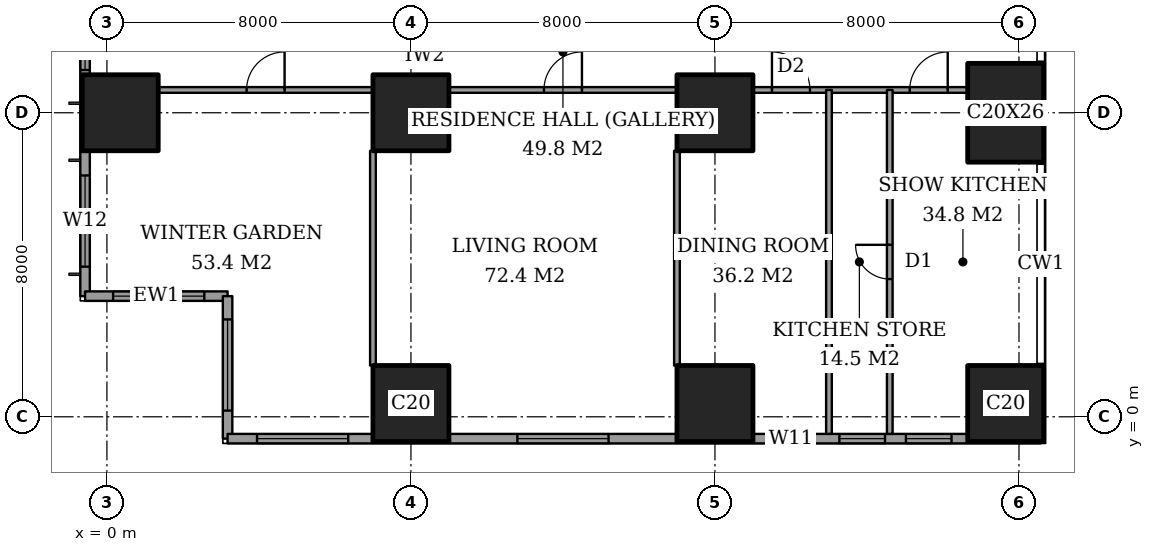
"""IFC4 building model, lengths in metres.
Left out: names, types, materials, properties, quantities, classifications, styles, units other than length and angle.
Written with IfcOpenShell. Run it as: python <this file> out.ifc"""

import sys

from ifc_helpers import new_model, si_unit, direction, frame, frame_2d, origin, origin_2d, place, context, subcontext, project, spatial, rectangle, extrude, element, fill, save


model = new_model("IFC4")
c1 = context("Model", 3, precision=1e-05, world=origin(), true_north=direction((0.0, 1.0)))
c2 = subcontext(c1, "Body", "Model", "MODEL_VIEW")
j1 = project(units=[si_unit("LENGTHUNIT", "METRE"), si_unit("PLANEANGLEUNIT", "RADIAN")], contexts=[c1])
p1 = place(None, origin())
s1 = spatial("IfcSite", under=j1, at=p1, CompositionType="ELEMENT")
p2 = place(p1, origin())
s2 = spatial("IfcBuilding", under=s1, at=p2, CompositionType="ELEMENT")
p3 = place(p2, frame((0.0, 0.0, 157.4)))
s3 = spatial("IfcBuildingStorey", under=s2, at=p3, CompositionType="ELEMENT", Elevation=157.4)
for number, where, z_axis, x_axis in (
    (1, (0.35, 8.0, 0.0), (0.0, 0.0, 1.0), (1.0, 0.0, 0.0)),
    (2, (8.0, 0.35, 0.0), (0.0, 0.0, 1.0), (1.0, 0.0, 0.0)),
    (3, (8.0, 8.0, 0.0), (0.0, 0.0, 1.0), (1.0, 0.0, 0.0)),
    (4, (16.0, 0.35, 0.0), (0.0, 0.0, 1.0), (1.0, 0.0, 0.0)),
    (5, (16.0, 8.0, 0.0), (0.0, 0.0, 1.0), (1.0, 0.0, 0.0)),
    (6, (23.65, 0.35, 0.0), (0.0, 0.0, 1.0), (1.0, 0.0, 0.0)),
):
    element("IfcColumn", number, at=place(p3, frame(where, z_axis=z_axis, x_axis=x_axis)), inside=s3, PredefinedType="COLUMN", context=c2, shape_type="SweptSolid", body=[
        extrude(rectangle(XDim=2.0, YDim=2.0, at=origin_2d()), origin(), (0.0, 0.0, 1.0), 3.6),
    ])
p4 = place(p3, frame((23.65, 8.0, 0.0), z_axis=(0.0, 0.0, 1.0), x_axis=(1.0, 0.0, 0.0)))
e7 = element("IfcColumn", 7, at=p4, inside=s3, PredefinedType="COLUMN", context=c2, shape_type="SweptSolid", body=[
    extrude(rectangle(XDim=2.0, YDim=2.6, at=origin_2d()), origin(), (0.0, 0.0, 1.0), 3.6),
])
p5 = place(p3, frame((-0.575, 44.825, 0.0), z_axis=(0.0, 0.0, 1.0), x_axis=(0.0, -1.0, 0.0)))
e8 = element("IfcWall", 8, at=p5, inside=s3, PredefinedType="SOLIDWALL", context=c2, shape_type="SweptSolid", body=[
    extrude(rectangle(XDim=41.65, YDim=0.25, at=frame_2d((20.825, 0.0))), origin(), (0.0, 0.0, 1.0), 3.6),
])
p6 = place(p5, frame((0.775, 0.0, 0.4)))
e9 = element("IfcOpeningElement", 9, at=p6, cuts=e8, PredefinedType="OPENING", context=c2, shape_type="SweptSolid", body=[
    extrude(rectangle(XDim=2.4, YDim=2.2, at=frame_2d((1.2, 1.1))), frame((0.0, 0.135, 0.0), z_axis=(0.0, -1.0, 0.0), x_axis=(1.0, 0.0, 0.0)), (0.0, 0.0, 1.0), 0.27),
])
p7 = place(p5, frame((6.1, 0.0, 0.4)))
e10 = element("IfcOpeningElement", 10, at=p7, cuts=e8, PredefinedType="OPENING", context=c2, shape_type="SweptSolid", body=[
    extrude(rectangle(XDim=1.2, YDim=2.2, at=frame_2d((0.6, 1.1))), frame((0.0, 0.135, 0.0), z_axis=(0.0, -1.0, 0.0), x_axis=(1.0, 0.0, 0.0)), (0.0, 0.0, 1.0), 0.27),
])
p8 = place(p5, frame((8.425, 0.0, 0.4)))
e11 = element("IfcOpeningElement", 11, at=p8, cuts=e8, PredefinedType="OPENING", context=c2, shape_type="SweptSolid", body=[
    extrude(rectangle(XDim=2.4, YDim=2.2, at=frame_2d((1.2, 1.1))), frame((0.0, 0.135, 0.0), z_axis=(0.0, -1.0, 0.0), x_axis=(1.0, 0.0, 0.0)), (0.0, 0.0, 1.0), 0.27),
])
p9 = place(p5, frame((15.625, 0.0, 0.4)))
e12 = element("IfcOpeningElement", 12, at=p9, cuts=e8, PredefinedType="OPENING", context=c2, shape_type="SweptSolid", body=[
    extrude(rectangle(XDim=2.4, YDim=2.2, at=frame_2d((1.2, 1.1))), frame((0.0, 0.135, 0.0), z_axis=(0.0, -1.0, 0.0), x_axis=(1.0, 0.0, 0.0)), (0.0, 0.0, 1.0), 0.27),
])
p10 = place(p5, frame((23.625, 0.0, 0.4)))
e13 = element("IfcOpeningElement", 13, at=p10, cuts=e8, PredefinedType="OPENING", context=c2, shape_type="SweptSolid", body=[
    extrude(rectangle(XDim=2.4, YDim=2.2, at=frame_2d((1.2, 1.1))), frame((0.0, 0.135, 0.0), z_axis=(0.0, -1.0, 0.0), x_axis=(1.0, 0.0, 0.0)), (0.0, 0.0, 1.0), 0.27),
])
p11 = place(p5, frame((30.825, 0.0, 0.4)))
e14 = element("IfcOpeningElement", 14, at=p11, cuts=e8, PredefinedType="OPENING", context=c2, shape_type="SweptSolid", body=[
    extrude(rectangle(XDim=2.4, YDim=2.2, at=frame_2d((1.2, 1.1))), frame((0.0, 0.135, 0.0), z_axis=(0.0, -1.0, 0.0), x_axis=(1.0, 0.0, 0.0)), (0.0, 0.0, 1.0), 0.27),
])
p12 = place(p5, frame((34.5, 0.0, 0.4)))
e15 = element("IfcOpeningElement", 15, at=p12, cuts=e8, PredefinedType="OPENING", context=c2, shape_type="SweptSolid", body=[
    extrude(rectangle(XDim=1.2, YDim=2.2, at=frame_2d((0.6, 1.1))), frame((0.0, 0.135, 0.0), z_axis=(0.0, -1.0, 0.0), x_axis=(1.0, 0.0, 0.0)), (0.0, 0.0, 1.0), 0.27),
])
p13 = place(p5, frame((38.475, 0.0, 0.4)))
e16 = element("IfcOpeningElement", 16, at=p13, cuts=e8, PredefinedType="OPENING", context=c2, shape_type="SweptSolid", body=[
    extrude(rectangle(XDim=2.4, YDim=2.2, at=frame_2d((1.2, 1.1))), frame((0.0, 0.135, 0.0), z_axis=(0.0, -1.0, 0.0), x_axis=(1.0, 0.0, 0.0)), (0.0, 0.0, 1.0), 0.27),
])
p14 = place(p3, frame((-0.575, 3.175, 0.0), z_axis=(0.0, 0.0, 1.0), x_axis=(1.0, 0.0, 0.0)))
e17 = element("IfcWall", 17, at=p14, inside=s3, PredefinedType="SOLIDWALL", context=c2, shape_type="SweptSolid", body=[
    extrude(rectangle(XDim=3.75, YDim=0.25, at=frame_2d((1.875, 0.0))), origin(), (0.0, 0.0, 1.0), 3.6),
])
p15 = place(p14, frame((0.738, 0.0, 0.4)))
e18 = element("IfcOpeningElement", 18, at=p15, cuts=e17, PredefinedType="OPENING", context=c2, shape_type="SweptSolid", body=[
    extrude(rectangle(XDim=2.4, YDim=2.2, at=frame_2d((1.2, 1.1))), frame((0.0, 0.135, 0.0), z_axis=(0.0, -1.0, 0.0), x_axis=(1.0, 0.0, 0.0)), (0.0, 0.0, 1.0), 0.27),
])
p16 = place(p3, frame((3.175, 3.175, 0.0), z_axis=(0.0, 0.0, 1.0), x_axis=(0.0, -1.0, 0.0)))
e19 = element("IfcWall", 19, at=p16, inside=s3, PredefinedType="SOLIDWALL", context=c2, shape_type="SweptSolid", body=[
    extrude(rectangle(XDim=3.75, YDim=0.25, at=frame_2d((1.875, 0.0))), origin(), (0.0, 0.0, 1.0), 3.6),
])
p17 = place(p16, frame((0.613, 0.0, 0.4)))
e20 = element("IfcOpeningElement", 20, at=p17, cuts=e19, PredefinedType="OPENING", context=c2, shape_type="SweptSolid", body=[
    extrude(rectangle(XDim=2.4, YDim=2.2, at=frame_2d((1.2, 1.1))), frame((0.0, 0.135, 0.0), z_axis=(0.0, -1.0, 0.0), x_axis=(1.0, 0.0, 0.0)), (0.0, 0.0, 1.0), 0.27),
])
p18 = place(p3, frame((3.175, -0.575, 0.0), z_axis=(0.0, 0.0, 1.0), x_axis=(1.0, 0.0, 0.0)))
e21 = element("IfcWall", 21, at=p18, inside=s3, PredefinedType="SOLIDWALL", context=c2, shape_type="SweptSolid", body=[
    extrude(rectangle(XDim=21.4, YDim=0.25, at=frame_2d((10.7, 0.0))), origin(), (0.0, 0.0, 1.0), 3.6),
])
p19 = place(p18, frame((0.775, 0.0, 0.4)))
e22 = element("IfcOpeningElement", 22, at=p19, cuts=e21, PredefinedType="OPENING", context=c2, shape_type="SweptSolid", body=[
    extrude(rectangle(XDim=2.4, YDim=2.2, at=frame_2d((1.2, 1.1))), frame((0.0, 0.135, 0.0), z_axis=(0.0, -1.0, 0.0), x_axis=(1.0, 0.0, 0.0)), (0.0, 0.0, 1.0), 0.27),
])
p20 = place(p18, frame((7.625, 0.0, 0.4)))
e23 = element("IfcOpeningElement", 23, at=p20, cuts=e21, PredefinedType="OPENING", context=c2, shape_type="SweptSolid", body=[
    extrude(rectangle(XDim=2.4, YDim=2.2, at=frame_2d((1.2, 1.1))), frame((0.0, 0.135, 0.0), z_axis=(0.0, -1.0, 0.0), x_axis=(1.0, 0.0, 0.0)), (0.0, 0.0, 1.0), 0.27),
])
p21 = place(p18, frame((14.225, 0.0, 0.4)))
e24 = element("IfcOpeningElement", 24, at=p21, cuts=e21, PredefinedType="OPENING", context=c2, shape_type="SweptSolid", body=[
    extrude(rectangle(XDim=1.2, YDim=2.2, at=frame_2d((0.6, 1.1))), frame((0.0, 0.135, 0.0), z_axis=(0.0, -1.0, 0.0), x_axis=(1.0, 0.0, 0.0)), (0.0, 0.0, 1.0), 0.27),
])
p22 = place(p18, frame((16.1, 0.0, 0.4)))
e25 = element("IfcOpeningElement", 25, at=p22, cuts=e21, PredefinedType="OPENING", context=c2, shape_type="SweptSolid", body=[
    extrude(rectangle(XDim=1.2, YDim=2.2, at=frame_2d((0.6, 1.1))), frame((0.0, 0.135, 0.0), z_axis=(0.0, -1.0, 0.0), x_axis=(1.0, 0.0, 0.0)), (0.0, 0.0, 1.0), 0.27),
])
p23 = place(p18, frame((17.85, 0.0, 0.4)))
e26 = element("IfcOpeningElement", 26, at=p23, cuts=e21, PredefinedType="OPENING", context=c2, shape_type="SweptSolid", body=[
    extrude(rectangle(XDim=1.2, YDim=2.2, at=frame_2d((0.6, 1.1))), frame((0.0, 0.135, 0.0), z_axis=(0.0, -1.0, 0.0), x_axis=(1.0, 0.0, 0.0)), (0.0, 0.0, 1.0), 0.27),
])
p24 = place(p3, frame((1.35, 8.6, 0.0), z_axis=(0.0, 0.0, 1.0), x_axis=(1.0, 0.0, 0.0)))
e27 = element("IfcWall", 27, at=p24, inside=s3, PredefinedType="PARTITIONING", context=c2, shape_type="SweptSolid", body=[
    extrude(rectangle(XDim=5.65, YDim=0.15, at=frame_2d((2.825, 0.0))), origin(), (0.0, 0.0, 1.0), 3.35),
])
p25 = place(p24, frame((2.325, 0.0, 0.0)))
e28 = element("IfcOpeningElement", 28, at=p25, cuts=e27, PredefinedType="OPENING", context=c2, shape_type="SweptSolid", body=[
    extrude(rectangle(XDim=1.0, YDim=2.1, at=frame_2d((0.5, 1.05))), frame((0.0, 0.085, 0.0), z_axis=(0.0, -1.0, 0.0), x_axis=(1.0, 0.0, 0.0)), (0.0, 0.0, 1.0), 0.17),
])
p26 = place(p3, frame((9.0, 8.6, 0.0), z_axis=(0.0, 0.0, 1.0), x_axis=(1.0, 0.0, 0.0)))
e29 = element("IfcWall", 29, at=p26, inside=s3, PredefinedType="PARTITIONING", context=c2, shape_type="SweptSolid", body=[
    extrude(rectangle(XDim=6.0, YDim=0.15, at=frame_2d((3.0, 0.0))), origin(), (0.0, 0.0, 1.0), 3.35),
])
p27 = place(p26, frame((2.5, 0.0, 0.0)))
e30 = element("IfcOpeningElement", 30, at=p27, cuts=e29, PredefinedType="OPENING", context=c2, shape_type="SweptSolid", body=[
    extrude(rectangle(XDim=1.0, YDim=2.1, at=frame_2d((0.5, 1.05))), frame((0.0, 0.085, 0.0), z_axis=(0.0, -1.0, 0.0), x_axis=(1.0, 0.0, 0.0)), (0.0, 0.0, 1.0), 0.17),
])
p28 = place(p3, frame((17.0, 8.6, 0.0), z_axis=(0.0, 0.0, 1.0), x_axis=(1.0, 0.0, 0.0)))
e31 = element("IfcWall", 31, at=p28, inside=s3, PredefinedType="PARTITIONING", context=c2, shape_type="SweptSolid", body=[
    extrude(rectangle(XDim=5.65, YDim=0.15, at=frame_2d((2.825, 0.0))), origin(), (0.0, 0.0, 1.0), 3.35),
])
p29 = place(p28, frame((0.5, 0.0, 0.0)))
e32 = element("IfcOpeningElement", 32, at=p29, cuts=e31, PredefinedType="OPENING", context=c2, shape_type="SweptSolid", body=[
    extrude(rectangle(XDim=1.0, YDim=2.1, at=frame_2d((0.5, 1.05))), frame((0.0, 0.085, 0.0), z_axis=(0.0, -1.0, 0.0), x_axis=(1.0, 0.0, 0.0)), (0.0, 0.0, 1.0), 0.17),
])
p30 = place(p28, frame((4.125, 0.0, 0.0)))
e33 = element("IfcOpeningElement", 33, at=p30, cuts=e31, PredefinedType="OPENING", context=c2, shape_type="SweptSolid", body=[
    extrude(rectangle(XDim=1.0, YDim=2.1, at=frame_2d((0.5, 1.05))), frame((0.0, 0.085, 0.0), z_axis=(0.0, -1.0, 0.0), x_axis=(1.0, 0.0, 0.0)), (0.0, 0.0, 1.0), 0.17),
])
for number, where, z_axis, x_axis in (
    (34, (7.0, 1.35, 0.0), (0.0, 0.0, 1.0), (0.0, 1.0, 0.0)),
    (35, (15.0, 1.35, 0.0), (0.0, 0.0, 1.0), (0.0, 1.0, 0.0)),
):
    element("IfcWall", number, at=place(p3, frame(where, z_axis=z_axis, x_axis=x_axis)), inside=s3, PredefinedType="PARTITIONING", context=c2, shape_type="SweptSolid", body=[
        extrude(rectangle(XDim=5.65, YDim=0.15, at=frame_2d((2.825, 0.0))), origin(), (0.0, 0.0, 1.0), 3.35),
    ])
p31 = place(p3, frame((19.0, -0.45, 0.0), z_axis=(0.0, 0.0, 1.0), x_axis=(0.0, 1.0, 0.0)))
e36 = element("IfcWall", 36, at=p31, inside=s3, PredefinedType="PARTITIONING", context=c2, shape_type="SweptSolid", body=[
    extrude(rectangle(XDim=9.05, YDim=0.15, at=frame_2d((4.525, 0.0))), origin(), (0.0, 0.0, 1.0), 3.35),
])
p32 = place(p3, frame((20.6, -0.45, 0.0), z_axis=(0.0, 0.0, 1.0), x_axis=(0.0, 1.0, 0.0)))
e37 = element("IfcWall", 37, at=p32, inside=s3, PredefinedType="PARTITIONING", context=c2, shape_type="SweptSolid", body=[
    extrude(rectangle(XDim=9.05, YDim=0.15, at=frame_2d((4.525, 0.0))), origin(), (0.0, 0.0, 1.0), 3.35),
])
p33 = place(p32, frame((4.075, 0.0, 0.0)))
e38 = element("IfcOpeningElement", 38, at=p33, cuts=e37, PredefinedType="OPENING", context=c2, shape_type="SweptSolid", body=[
    extrude(rectangle(XDim=0.9, YDim=2.1, at=frame_2d((0.45, 1.05))), frame((0.0, 0.085, 0.0), z_axis=(0.0, -1.0, 0.0), x_axis=(1.0, 0.0, 0.0)), (0.0, 0.0, 1.0), 0.17),
])
p34 = place(p12, origin())
e39 = element("IfcWindow", 39, at=p34, inside=s3, PartitioningType="SINGLE_PANEL", PredefinedType="WINDOW", context=c2, shape_type="SweptSolid", body=[
    extrude(rectangle(XDim=1.2, YDim=2.2, at=frame_2d((0.6, 1.1))), frame((0.0, 0.03, 0.0), z_axis=(0.0, -1.0, 0.0), x_axis=(1.0, 0.0, 0.0)), (0.0, 0.0, 1.0), 0.06),
])
fill(e15, e39)
p35 = place(p13, origin())
e40 = element("IfcWindow", 40, at=p35, inside=s3, PartitioningType="SINGLE_PANEL", PredefinedType="WINDOW", context=c2, shape_type="SweptSolid", body=[
    extrude(rectangle(XDim=2.4, YDim=2.2, at=frame_2d((1.2, 1.1))), frame((0.0, 0.03, 0.0), z_axis=(0.0, -1.0, 0.0), x_axis=(1.0, 0.0, 0.0)), (0.0, 0.0, 1.0), 0.06),
])
fill(e16, e40)
p36 = place(p15, origin())
e41 = element("IfcWindow", 41, at=p36, inside=s3, PartitioningType="SINGLE_PANEL", PredefinedType="WINDOW", context=c2, shape_type="SweptSolid", body=[
    extrude(rectangle(XDim=2.4, YDim=2.2, at=frame_2d((1.2, 1.1))), frame((0.0, 0.03, 0.0), z_axis=(0.0, -1.0, 0.0), x_axis=(1.0, 0.0, 0.0)), (0.0, 0.0, 1.0), 0.06),
])
fill(e18, e41)
p37 = place(p17, origin())
e42 = element("IfcWindow", 42, at=p37, inside=s3, PartitioningType="SINGLE_PANEL", PredefinedType="WINDOW", context=c2, shape_type="SweptSolid", body=[
    extrude(rectangle(XDim=2.4, YDim=2.2, at=frame_2d((1.2, 1.1))), frame((0.0, 0.03, 0.0), z_axis=(0.0, -1.0, 0.0), x_axis=(1.0, 0.0, 0.0)), (0.0, 0.0, 1.0), 0.06),
])
fill(e20, e42)
p38 = place(p19, origin())
e43 = element("IfcWindow", 43, at=p38, inside=s3, PartitioningType="SINGLE_PANEL", PredefinedType="WINDOW", context=c2, shape_type="SweptSolid", body=[
    extrude(rectangle(XDim=2.4, YDim=2.2, at=frame_2d((1.2, 1.1))), frame((0.0, 0.03, 0.0), z_axis=(0.0, -1.0, 0.0), x_axis=(1.0, 0.0, 0.0)), (0.0, 0.0, 1.0), 0.06),
])
fill(e22, e43)
p39 = place(p20, origin())
e44 = element("IfcWindow", 44, at=p39, inside=s3, PartitioningType="SINGLE_PANEL", PredefinedType="WINDOW", context=c2, shape_type="SweptSolid", body=[
    extrude(rectangle(XDim=2.4, YDim=2.2, at=frame_2d((1.2, 1.1))), frame((0.0, 0.03, 0.0), z_axis=(0.0, -1.0, 0.0), x_axis=(1.0, 0.0, 0.0)), (0.0, 0.0, 1.0), 0.06),
])
fill(e23, e44)
p40 = place(p21, origin())
e45 = element("IfcWindow", 45, at=p40, inside=s3, PartitioningType="SINGLE_PANEL", PredefinedType="WINDOW", context=c2, shape_type="SweptSolid", body=[
    extrude(rectangle(XDim=1.2, YDim=2.2, at=frame_2d((0.6, 1.1))), frame((0.0, 0.03, 0.0), z_axis=(0.0, -1.0, 0.0), x_axis=(1.0, 0.0, 0.0)), (0.0, 0.0, 1.0), 0.06),
])
fill(e24, e45)
p41 = place(p22, origin())
e46 = element("IfcWindow", 46, at=p41, inside=s3, PartitioningType="SINGLE_PANEL", PredefinedType="WINDOW", context=c2, shape_type="SweptSolid", body=[
    extrude(rectangle(XDim=1.2, YDim=2.2, at=frame_2d((0.6, 1.1))), frame((0.0, 0.03, 0.0), z_axis=(0.0, -1.0, 0.0), x_axis=(1.0, 0.0, 0.0)), (0.0, 0.0, 1.0), 0.06),
])
fill(e25, e46)
p42 = place(p23, origin())
e47 = element("IfcWindow", 47, at=p42, inside=s3, PartitioningType="SINGLE_PANEL", PredefinedType="WINDOW", context=c2, shape_type="SweptSolid", body=[
    extrude(rectangle(XDim=1.2, YDim=2.2, at=frame_2d((0.6, 1.1))), frame((0.0, 0.03, 0.0), z_axis=(0.0, -1.0, 0.0), x_axis=(1.0, 0.0, 0.0)), (0.0, 0.0, 1.0), 0.06),
])
fill(e26, e47)
p43 = place(p25, origin())
e48 = element("IfcDoor", 48, at=p43, inside=s3, OperationType="SINGLE_SWING_LEFT", PredefinedType="DOOR", context=c2, shape_type="SweptSolid", body=[
    extrude(rectangle(XDim=1.0, YDim=2.1, at=frame_2d((0.5, 1.05))), frame((0.0, 0.025, 0.0), z_axis=(0.0, -1.0, 0.0), x_axis=(1.0, 0.0, 0.0)), (0.0, 0.0, 1.0), 0.05),
])
fill(e28, e48)
p44 = place(p27, origin())
e49 = element("IfcDoor", 49, at=p44, inside=s3, OperationType="SINGLE_SWING_LEFT", PredefinedType="DOOR", context=c2, shape_type="SweptSolid", body=[
    extrude(rectangle(XDim=1.0, YDim=2.1, at=frame_2d((0.5, 1.05))), frame((0.0, 0.025, 0.0), z_axis=(0.0, -1.0, 0.0), x_axis=(1.0, 0.0, 0.0)), (0.0, 0.0, 1.0), 0.05),
])
fill(e30, e49)
p45 = place(p29, origin())
e50 = element("IfcDoor", 50, at=p45, inside=s3, OperationType="SINGLE_SWING_RIGHT", PredefinedType="DOOR", context=c2, shape_type="SweptSolid", body=[
    extrude(rectangle(XDim=1.0, YDim=2.1, at=frame_2d((0.5, 1.05))), frame((0.0, 0.025, 0.0), z_axis=(0.0, -1.0, 0.0), x_axis=(1.0, 0.0, 0.0)), (0.0, 0.0, 1.0), 0.05),
])
fill(e32, e50)
p46 = place(p33, origin())
e51 = element("IfcDoor", 51, at=p46, inside=s3, OperationType="SINGLE_SWING_LEFT", PredefinedType="DOOR", context=c2, shape_type="SweptSolid", body=[
    extrude(rectangle(XDim=0.9, YDim=2.1, at=frame_2d((0.45, 1.05))), frame((0.0, 0.025, 0.0), z_axis=(0.0, -1.0, 0.0), x_axis=(1.0, 0.0, 0.0)), (0.0, 0.0, 1.0), 0.05),
])
fill(e38, e51)
p47 = place(p30, origin())
e52 = element("IfcDoor", 52, at=p47, inside=s3, OperationType="SINGLE_SWING_LEFT", PredefinedType="DOOR", context=c2, shape_type="SweptSolid", body=[
    extrude(rectangle(XDim=1.0, YDim=2.1, at=frame_2d((0.5, 1.05))), frame((0.0, 0.025, 0.0), z_axis=(0.0, -1.0, 0.0), x_axis=(1.0, 0.0, 0.0)), (0.0, 0.0, 1.0), 0.05),
])
fill(e33, e52)
save(model, sys.argv[1])
